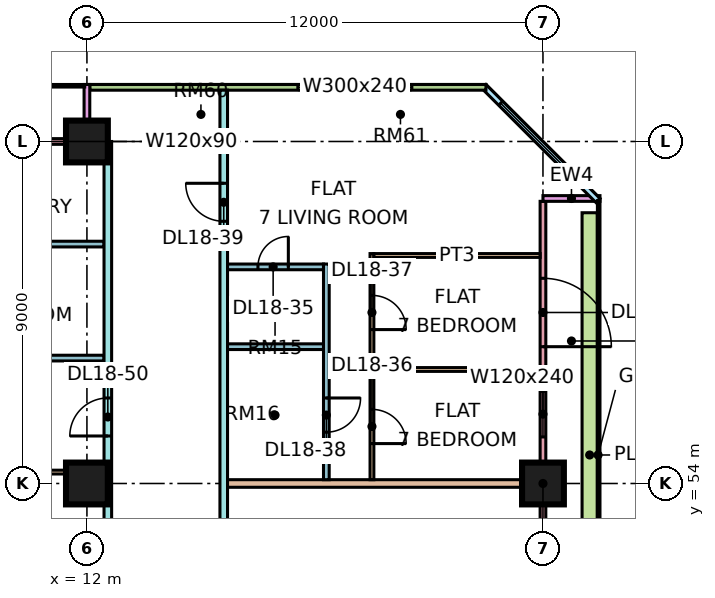
"""IFC4 building model, lengths in metres.
Left out: names, types, materials, properties, quantities, classifications, styles, units other than length and angle.
Written with IfcOpenShell. Run it as: python <this file> out.ifc"""

import sys

from ifc_helpers import new_model, si_unit, direction, frame, frame_2d, origin, origin_2d, place, context, subcontext, project, spatial, rectangle, extrude, element, fill, save


model = new_model("IFC4")
c1 = context("Model", 3, precision=1e-05, world=origin(), true_north=direction((0.0, 1.0)))
c2 = subcontext(c1, "Body", "Model", "MODEL_VIEW")
j1 = project(units=[si_unit("LENGTHUNIT", "METRE"), si_unit("PLANEANGLEUNIT", "RADIAN")], contexts=[c1])
p1 = place(None, origin())
s1 = spatial("IfcSite", under=j1, at=p1, CompositionType="ELEMENT")
p2 = place(p1, origin())
s2 = spatial("IfcBuilding", under=s1, at=p2, CompositionType="ELEMENT")
p3 = place(p2, frame((0.0, 0.0, 82.65)))
s3 = spatial("IfcBuildingStorey", under=s2, at=p3, CompositionType="ELEMENT", Elevation=82.65)
for number, where, z_axis, x_axis in (
    (1, (12.0, 54.0, 0.0), (0.0, 0.0, 1.0), (1.0, 0.0, 0.0)),
    (2, (12.0, 63.0, 0.0), (0.0, 0.0, 1.0), (1.0, 0.0, 0.0)),
    (3, (24.0, 54.0, 0.0), (0.0, 0.0, 1.0), (1.0, 0.0, 0.0)),
):
    element("IfcColumn", number, at=place(p3, frame(where, z_axis=z_axis, x_axis=x_axis)), inside=s3, PredefinedType="COLUMN", context=c2, shape_type="SweptSolid", body=[
        extrude(rectangle(XDim=1.1, YDim=1.1, at=origin_2d()), origin(), (0.0, 0.0, 1.0), 3.75),
    ])
p4 = place(p3, frame((24.0, 48.075, 0.0), z_axis=(0.0, 0.0, 1.0), x_axis=(0.0, 1.0, 0.0)))
e4 = element("IfcWall", 4, at=p4, inside=s3, PredefinedType="SOLIDWALL", context=c2, shape_type="SweptSolid", body=[
    extrude(rectangle(XDim=13.35, YDim=0.15, at=frame_2d((6.675, 0.0))), origin(), (0.0, 0.0, 1.0), 3.3),
])
p5 = place(p4, frame((0.538, 0.0, 0.45)))
e5 = element("IfcOpeningElement", 5, at=p5, cuts=e4, PredefinedType="OPENING", context=c2, shape_type="SweptSolid", body=[
    extrude(rectangle(XDim=4.2, YDim=2.4, at=frame_2d((2.1, 1.2))), frame((0.0, 0.085, 0.0), z_axis=(0.0, -1.0, 0.0), x_axis=(1.0, 0.0, 0.0)), (0.0, 0.0, 1.0), 0.17),
])
p6 = place(p4, frame((7.15, 0.0, 0.45)))
e6 = element("IfcOpeningElement", 6, at=p6, cuts=e4, PredefinedType="OPENING", context=c2, shape_type="SweptSolid", body=[
    extrude(rectangle(XDim=1.2, YDim=2.4, at=frame_2d((0.6, 1.2))), frame((0.0, 0.085, 0.0), z_axis=(0.0, -1.0, 0.0), x_axis=(1.0, 0.0, 0.0)), (0.0, 0.0, 1.0), 0.17),
])
p7 = place(p4, frame((9.525, 0.0, 0.0)))
e7 = element("IfcOpeningElement", 7, at=p7, cuts=e4, PredefinedType="OPENING", context=c2, shape_type="SweptSolid", body=[
    extrude(rectangle(XDim=1.8, YDim=2.4, at=frame_2d((0.9, 1.2))), frame((0.0, 0.085, 0.0), z_axis=(0.0, -1.0, 0.0), x_axis=(1.0, 0.0, 0.0)), (0.0, 0.0, 1.0), 0.17),
])
p8 = place(p3, frame((25.5, 61.5, 0.0), z_axis=(0.0, 0.0, 1.0), x_axis=(-1.0, 0.0, 0.0)))
e8 = element("IfcWall", 8, at=p8, inside=s3, PredefinedType="SOLIDWALL", context=c2, shape_type="SweptSolid", body=[
    extrude(rectangle(XDim=1.5, YDim=0.15, at=frame_2d((0.75, 0.0))), origin(), (0.0, 0.0, 1.0), 3.3),
])
p9 = place(p3, frame((25.447, 61.447, 0.0), z_axis=(0.0, 0.0, 1.0), x_axis=(-0.707106781187, 0.707106781187, 0.0)))
e9 = element("IfcWall", 9, at=p9, inside=s3, PredefinedType="SOLIDWALL", context=c2, shape_type="SweptSolid", body=[
    extrude(rectangle(XDim=4.243, YDim=0.15, at=frame_2d((2.121, 0.0))), origin(), (0.0, 0.0, 1.0), 3.3),
])
p10 = place(p9, frame((0.621, 0.0, 0.45)))
e10 = element("IfcOpeningElement", 10, at=p10, cuts=e9, PredefinedType="OPENING", context=c2, shape_type="SweptSolid", body=[
    extrude(rectangle(XDim=3.0, YDim=2.4, at=frame_2d((1.5, 1.2))), frame((0.0, 0.085, 0.0), z_axis=(0.0, -1.0, 0.0), x_axis=(1.0, 0.0, 0.0)), (0.0, 0.0, 1.0), 0.17),
])
p11 = place(p3, frame((22.5, 64.425, 0.0), z_axis=(0.0, 0.0, 1.0), x_axis=(-1.0, 0.0, 0.0)))
e11 = element("IfcWall", 11, at=p11, inside=s3, PredefinedType="SOLIDWALL", context=c2, shape_type="SweptSolid", body=[
    extrude(rectangle(XDim=10.425, YDim=0.15, at=frame_2d((5.212, 0.0))), origin(), (0.0, 0.0, 1.0), 3.3),
])
p12 = place(p11, frame((1.95, 0.0, 0.45)))
e12 = element("IfcOpeningElement", 12, at=p12, cuts=e11, PredefinedType="OPENING", context=c2, shape_type="SweptSolid", body=[
    extrude(rectangle(XDim=3.0, YDim=2.4, at=frame_2d((1.5, 1.2))), frame((0.0, 0.085, 0.0), z_axis=(0.0, -1.0, 0.0), x_axis=(1.0, 0.0, 0.0)), (0.0, 0.0, 1.0), 0.17),
])
p13 = place(p3, frame((11.925, 63.0, 0.0), z_axis=(0.0, 0.0, 1.0), x_axis=(-1.0, 0.0, 0.0)))
e13 = element("IfcWall", 13, at=p13, inside=s3, PredefinedType="SOLIDWALL", context=c2, shape_type="SweptSolid", body=[
    extrude(rectangle(XDim=10.35, YDim=0.15, at=frame_2d((5.175, 0.0))), origin(), (0.0, 0.0, 1.0), 3.3),
])
p14 = place(p13, frame((1.775, 0.0, 1.7)))
e14 = element("IfcOpeningElement", 14, at=p14, cuts=e13, PredefinedType="OPENING", context=c2, shape_type="SweptSolid", body=[
    extrude(rectangle(XDim=1.2, YDim=0.9, at=frame_2d((0.6, 0.45))), frame((0.0, 0.085, 0.0), z_axis=(0.0, -1.0, 0.0), x_axis=(1.0, 0.0, 0.0)), (0.0, 0.0, 1.0), 0.17),
])
p15 = place(p13, frame((6.962, 0.0, 0.0)))
e15 = element("IfcOpeningElement", 15, at=p15, cuts=e13, PredefinedType="OPENING", context=c2, shape_type="SweptSolid", body=[
    extrude(rectangle(XDim=1.8, YDim=2.4, at=frame_2d((0.9, 1.2))), frame((0.0, 0.085, 0.0), z_axis=(0.0, -1.0, 0.0), x_axis=(1.0, 0.0, 0.0)), (0.0, 0.0, 1.0), 0.17),
])
p16 = place(p3, frame((12.0, 64.5, 0.0), z_axis=(0.0, 0.0, 1.0), x_axis=(0.0, -1.0, 0.0)))
e16 = element("IfcWall", 16, at=p16, inside=s3, PredefinedType="SOLIDWALL", context=c2, shape_type="SweptSolid", body=[
    extrude(rectangle(XDim=1.5, YDim=0.15, at=frame_2d((0.75, 0.0))), origin(), (0.0, 0.0, 1.0), 3.3),
])
p17 = place(p3, frame((25.229, 48.375, 0.0), z_axis=(0.0, 0.0, 1.0), x_axis=(0.0, 1.0, 0.0)))
e17 = element("IfcWall", 17, at=p17, inside=s3, PredefinedType="SOLIDWALL", context=c2, shape_type="SweptSolid", body=[
    extrude(rectangle(XDim=12.75, YDim=0.4, at=frame_2d((6.375, 0.0))), origin(), (0.0, 0.0, 1.0), 0.7),
])
p18 = place(p3, frame((7.8, 54.3, 0.0), z_axis=(0.0, 0.0, 1.0), x_axis=(1.0, 0.0, 0.0)))
e18 = element("IfcWall", 18, at=p18, inside=s3, PredefinedType="PARTITIONING", context=c2, shape_type="SweptSolid", body=[
    extrude(rectangle(XDim=4.65, YDim=0.1, at=frame_2d((2.325, 0.0))), origin(), (0.0, 0.0, 1.0), 3.3),
])
for number, where, z_axis, x_axis in (
    (19, (7.825, 57.3, 0.0), (0.0, 0.0, 1.0), (1.0, 0.0, 0.0)),
    (20, (7.825, 60.3, 0.0), (0.0, 0.0, 1.0), (1.0, 0.0, 0.0)),
):
    element("IfcWall", number, at=place(p3, frame(where, z_axis=z_axis, x_axis=x_axis)), inside=s3, PredefinedType="PARTITIONING", context=c2, shape_type="SweptSolid", body=[
        extrude(rectangle(XDim=4.625, YDim=0.15, at=frame_2d((2.312, 0.0))), origin(), (0.0, 0.0, 1.0), 3.3),
    ])
p19 = place(p3, frame((12.55, 20.0, 0.0), z_axis=(0.0, 0.0, 1.0), x_axis=(0.0, 1.0, 0.0)))
e21 = element("IfcWall", 21, at=p19, inside=s3, PredefinedType="PARTITIONING", context=c2, shape_type="SweptSolid", body=[
    extrude(rectangle(XDim=43.0, YDim=0.2, at=frame_2d((21.5, 0.0))), origin(), (0.0, 0.0, 1.0), 3.3),
])
p20 = place(p19, frame((16.95, 0.0, 0.0)))
e22 = element("IfcOpeningElement", 22, at=p20, cuts=e21, PredefinedType="OPENING", context=c2, shape_type="SweptSolid", body=[
    extrude(rectangle(XDim=1.0, YDim=2.1, at=frame_2d((0.5, 1.05))), frame((0.0, 0.11, 0.0), z_axis=(0.0, -1.0, 0.0), x_axis=(1.0, 0.0, 0.0)), (0.0, 0.0, 1.0), 0.22),
])
p21 = place(p19, frame((35.25, 0.0, 0.0)))
e23 = element("IfcOpeningElement", 23, at=p21, cuts=e21, PredefinedType="OPENING", context=c2, shape_type="SweptSolid", body=[
    extrude(rectangle(XDim=1.0, YDim=2.1, at=frame_2d((0.5, 1.05))), frame((0.0, 0.11, 0.0), z_axis=(0.0, -1.0, 0.0), x_axis=(1.0, 0.0, 0.0)), (0.0, 0.0, 1.0), 0.22),
])
p22 = place(p19, frame((0.6, 0.0, 0.0)))
e24 = element("IfcOpeningElement", 24, at=p22, cuts=e21, PredefinedType="OPENING", context=c2, shape_type="SweptSolid", body=[
    extrude(rectangle(XDim=1.2, YDim=2.1, at=frame_2d((0.6, 1.05))), frame((0.0, 0.11, 0.0), z_axis=(0.0, -1.0, 0.0), x_axis=(1.0, 0.0, 0.0)), (0.0, 0.0, 1.0), 0.22),
])
p23 = place(p19, frame((14.1, 0.0, 0.0)))
e25 = element("IfcOpeningElement", 25, at=p23, cuts=e21, PredefinedType="OPENING", context=c2, shape_type="SweptSolid", body=[
    extrude(rectangle(XDim=1.0, YDim=2.1, at=frame_2d((0.5, 1.05))), frame((0.0, 0.11, 0.0), z_axis=(0.0, -1.0, 0.0), x_axis=(1.0, 0.0, 0.0)), (0.0, 0.0, 1.0), 0.22),
])
p24 = place(p3, frame((15.6, 51.225, 0.0), z_axis=(0.0, 0.0, 1.0), x_axis=(0.0, 1.0, 0.0)))
e26 = element("IfcWall", 26, at=p24, inside=s3, PredefinedType="PARTITIONING", context=c2, shape_type="SweptSolid", body=[
    extrude(rectangle(XDim=13.125, YDim=0.2, at=frame_2d((6.562, 0.0))), origin(), (0.0, 0.0, 1.0), 3.3),
])
p25 = place(p24, frame((9.675, 0.0, 0.0)))
e27 = element("IfcOpeningElement", 27, at=p25, cuts=e26, PredefinedType="OPENING", context=c2, shape_type="SweptSolid", body=[
    extrude(rectangle(XDim=1.0, YDim=2.1, at=frame_2d((0.5, 1.05))), frame((0.0, 0.11, 0.0), z_axis=(0.0, -1.0, 0.0), x_axis=(1.0, 0.0, 0.0)), (0.0, 0.0, 1.0), 0.22),
])
p26 = place(p3, frame((15.7, 54.0, 0.0), z_axis=(0.0, 0.0, 1.0), x_axis=(1.0, 0.0, 0.0)))
e28 = element("IfcWall", 28, at=p26, inside=s3, PredefinedType="PARTITIONING", context=c2, shape_type="SweptSolid", body=[
    extrude(rectangle(XDim=8.226, YDim=0.2, at=frame_2d((4.113, 0.0))), origin(), (0.0, 0.0, 1.0), 3.3),
])
p27 = place(p3, frame((15.7, 57.6, 0.0), z_axis=(0.0, 0.0, 1.0), x_axis=(1.0, 0.0, 0.0)))
e29 = element("IfcWall", 29, at=p27, inside=s3, PredefinedType="PARTITIONING", context=c2, shape_type="SweptSolid", body=[
    extrude(rectangle(XDim=2.525, YDim=0.15, at=frame_2d((1.263, 0.0))), origin(), (0.0, 0.0, 1.0), 3.3),
])
p28 = place(p3, frame((15.7, 59.7, 0.0), z_axis=(0.0, 0.0, 1.0), x_axis=(1.0, 0.0, 0.0)))
e30 = element("IfcWall", 30, at=p28, inside=s3, PredefinedType="PARTITIONING", context=c2, shape_type="SweptSolid", body=[
    extrude(rectangle(XDim=2.525, YDim=0.15, at=frame_2d((1.263, 0.0))), origin(), (0.0, 0.0, 1.0), 3.3),
])
p29 = place(p28, frame((0.8, 0.0, 0.0)))
e31 = element("IfcOpeningElement", 31, at=p29, cuts=e30, PredefinedType="OPENING", context=c2, shape_type="SweptSolid", body=[
    extrude(rectangle(XDim=0.8, YDim=2.1, at=frame_2d((0.4, 1.05))), frame((0.0, 0.085, 0.0), z_axis=(0.0, -1.0, 0.0), x_axis=(1.0, 0.0, 0.0)), (0.0, 0.0, 1.0), 0.17),
])
p30 = place(p3, frame((18.3, 54.1, 0.0), z_axis=(0.0, 0.0, 1.0), x_axis=(0.0, 1.0, 0.0)))
e32 = element("IfcWall", 32, at=p30, inside=s3, PredefinedType="PARTITIONING", context=c2, shape_type="SweptSolid", body=[
    extrude(rectangle(XDim=5.675, YDim=0.15, at=frame_2d((2.837, 0.0))), origin(), (0.0, 0.0, 1.0), 3.3),
])
p31 = place(p30, frame((1.25, 0.0, 0.0)))
e33 = element("IfcOpeningElement", 33, at=p31, cuts=e32, PredefinedType="OPENING", context=c2, shape_type="SweptSolid", body=[
    extrude(rectangle(XDim=0.9, YDim=2.1, at=frame_2d((0.45, 1.05))), frame((0.0, 0.085, 0.0), z_axis=(0.0, -1.0, 0.0), x_axis=(1.0, 0.0, 0.0)), (0.0, 0.0, 1.0), 0.17),
])
p32 = place(p3, frame((19.5, 54.1, 0.0), z_axis=(0.0, 0.0, 1.0), x_axis=(0.0, 1.0, 0.0)))
e34 = element("IfcWall", 34, at=p32, inside=s3, PredefinedType="PARTITIONING", context=c2, shape_type="SweptSolid", body=[
    extrude(rectangle(XDim=5.95, YDim=0.1, at=frame_2d((2.975, 0.0))), origin(), (0.0, 0.0, 1.0), 3.3),
])
p33 = place(p32, frame((0.95, 0.0, 0.0)))
e35 = element("IfcOpeningElement", 35, at=p33, cuts=e34, PredefinedType="OPENING", context=c2, shape_type="SweptSolid", body=[
    extrude(rectangle(XDim=0.9, YDim=2.1, at=frame_2d((0.45, 1.05))), frame((0.0, 0.06, 0.0), z_axis=(0.0, -1.0, 0.0), x_axis=(1.0, 0.0, 0.0)), (0.0, 0.0, 1.0), 0.12),
])
p34 = place(p32, frame((3.95, 0.0, 0.0)))
e36 = element("IfcOpeningElement", 36, at=p34, cuts=e34, PredefinedType="OPENING", context=c2, shape_type="SweptSolid", body=[
    extrude(rectangle(XDim=0.9, YDim=2.1, at=frame_2d((0.45, 1.05))), frame((0.0, 0.06, 0.0), z_axis=(0.0, -1.0, 0.0), x_axis=(1.0, 0.0, 0.0)), (0.0, 0.0, 1.0), 0.12),
])
for number, where, z_axis, x_axis in (
    (37, (19.55, 57.0, 0.0), (0.0, 0.0, 1.0), (1.0, 0.0, 0.0)),
    (38, (19.55, 60.0, 0.0), (0.0, 0.0, 1.0), (1.0, 0.0, 0.0)),
):
    element("IfcWall", number, at=place(p3, frame(where, z_axis=z_axis, x_axis=x_axis)), inside=s3, PredefinedType="PARTITIONING", context=c2, shape_type="SweptSolid", body=[
        extrude(rectangle(XDim=4.376, YDim=0.1, at=frame_2d((2.188, 0.0))), origin(), (0.0, 0.0, 1.0), 3.3),
    ])
p35 = place(p6, origin())
e39 = element("IfcWindow", 39, at=p35, inside=s3, PartitioningType="SINGLE_PANEL", PredefinedType="WINDOW", context=c2, shape_type="SweptSolid", body=[
    extrude(rectangle(XDim=1.2, YDim=2.4, at=frame_2d((0.6, 1.2))), frame((0.0, 0.03, 0.0), z_axis=(0.0, -1.0, 0.0), x_axis=(1.0, 0.0, 0.0)), (0.0, 0.0, 1.0), 0.06),
])
fill(e6, e39)
p36 = place(p7, frame((1.8, 0.0, 0.0), z_axis=(0.0, 0.0, 1.0), x_axis=(-1.0, 0.0, 0.0)))
e40 = element("IfcDoor", 40, at=p36, inside=s3, OperationType="DOUBLE_DOOR_SINGLE_SWING", PredefinedType="DOOR", context=c2, shape_type="SweptSolid", body=[
    extrude(rectangle(XDim=1.8, YDim=2.4, at=frame_2d((0.9, 1.2))), frame((0.0, 0.025, 0.0), z_axis=(0.0, -1.0, 0.0), x_axis=(1.0, 0.0, 0.0)), (0.0, 0.0, 1.0), 0.05),
])
fill(e7, e40)
p37 = place(p10, origin())
e41 = element("IfcWindow", 41, at=p37, inside=s3, PartitioningType="SINGLE_PANEL", PredefinedType="WINDOW", context=c2, shape_type="SweptSolid", body=[
    extrude(rectangle(XDim=3.0, YDim=2.4, at=frame_2d((1.5, 1.2))), frame((0.0, 0.03, 0.0), z_axis=(0.0, -1.0, 0.0), x_axis=(1.0, 0.0, 0.0)), (0.0, 0.0, 1.0), 0.06),
])
fill(e10, e41)
p38 = place(p12, origin())
e42 = element("IfcWindow", 42, at=p38, inside=s3, PartitioningType="SINGLE_PANEL", PredefinedType="WINDOW", context=c2, shape_type="SweptSolid", body=[
    extrude(rectangle(XDim=3.0, YDim=2.4, at=frame_2d((1.5, 1.2))), frame((0.0, 0.03, 0.0), z_axis=(0.0, -1.0, 0.0), x_axis=(1.0, 0.0, 0.0)), (0.0, 0.0, 1.0), 0.06),
])
fill(e12, e42)
p39 = place(p29, frame((0.8, 0.0, 0.0), z_axis=(0.0, 0.0, 1.0), x_axis=(-1.0, 0.0, 0.0)))
e43 = element("IfcDoor", 43, at=p39, inside=s3, OperationType="SINGLE_SWING_RIGHT", PredefinedType="DOOR", context=c2, shape_type="SweptSolid", body=[
    extrude(rectangle(XDim=0.8, YDim=2.1, at=frame_2d((0.4, 1.05))), frame((0.0, 0.025, 0.0), z_axis=(0.0, -1.0, 0.0), x_axis=(1.0, 0.0, 0.0)), (0.0, 0.0, 1.0), 0.05),
])
fill(e31, e43)
p40 = place(p33, frame((0.9, 0.0, 0.0), z_axis=(0.0, 0.0, 1.0), x_axis=(-1.0, 0.0, 0.0)))
e44 = element("IfcDoor", 44, at=p40, inside=s3, OperationType="SINGLE_SWING_LEFT", PredefinedType="DOOR", context=c2, shape_type="SweptSolid", body=[
    extrude(rectangle(XDim=0.9, YDim=2.1, at=frame_2d((0.45, 1.05))), frame((0.0, 0.025, 0.0), z_axis=(0.0, -1.0, 0.0), x_axis=(1.0, 0.0, 0.0)), (0.0, 0.0, 1.0), 0.05),
])
fill(e35, e44)
p41 = place(p34, frame((0.9, 0.0, 0.0), z_axis=(0.0, 0.0, 1.0), x_axis=(-1.0, 0.0, 0.0)))
e45 = element("IfcDoor", 45, at=p41, inside=s3, OperationType="SINGLE_SWING_LEFT", PredefinedType="DOOR", context=c2, shape_type="SweptSolid", body=[
    extrude(rectangle(XDim=0.9, YDim=2.1, at=frame_2d((0.45, 1.05))), frame((0.0, 0.025, 0.0), z_axis=(0.0, -1.0, 0.0), x_axis=(1.0, 0.0, 0.0)), (0.0, 0.0, 1.0), 0.05),
])
fill(e36, e45)
p42 = place(p31, origin())
e46 = element("IfcDoor", 46, at=p42, inside=s3, OperationType="SINGLE_SWING_RIGHT", PredefinedType="DOOR", context=c2, shape_type="SweptSolid", body=[
    extrude(rectangle(XDim=0.9, YDim=2.1, at=frame_2d((0.45, 1.05))), frame((0.0, 0.025, 0.0), z_axis=(0.0, -1.0, 0.0), x_axis=(1.0, 0.0, 0.0)), (0.0, 0.0, 1.0), 0.05),
])
fill(e33, e46)
p43 = place(p25, frame((1.0, 0.0, 0.0), z_axis=(0.0, 0.0, 1.0), x_axis=(-1.0, 0.0, 0.0)))
e47 = element("IfcDoor", 47, at=p43, inside=s3, OperationType="SINGLE_SWING_RIGHT", PredefinedType="DOOR", context=c2, shape_type="SweptSolid", body=[
    extrude(rectangle(XDim=1.0, YDim=2.1, at=frame_2d((0.5, 1.05))), frame((0.0, 0.025, 0.0), z_axis=(0.0, -1.0, 0.0), x_axis=(1.0, 0.0, 0.0)), (0.0, 0.0, 1.0), 0.05),
])
fill(e27, e47)
p44 = place(p21, origin())
e48 = element("IfcDoor", 48, at=p44, inside=s3, OperationType="SINGLE_SWING_LEFT", PredefinedType="DOOR", context=c2, shape_type="SweptSolid", body=[
    extrude(rectangle(XDim=1.0, YDim=2.1, at=frame_2d((0.5, 1.05))), frame((0.0, 0.025, 0.0), z_axis=(0.0, -1.0, 0.0), x_axis=(1.0, 0.0, 0.0)), (0.0, 0.0, 1.0), 0.05),
])
fill(e23, e48)
save(model, sys.argv[1])
